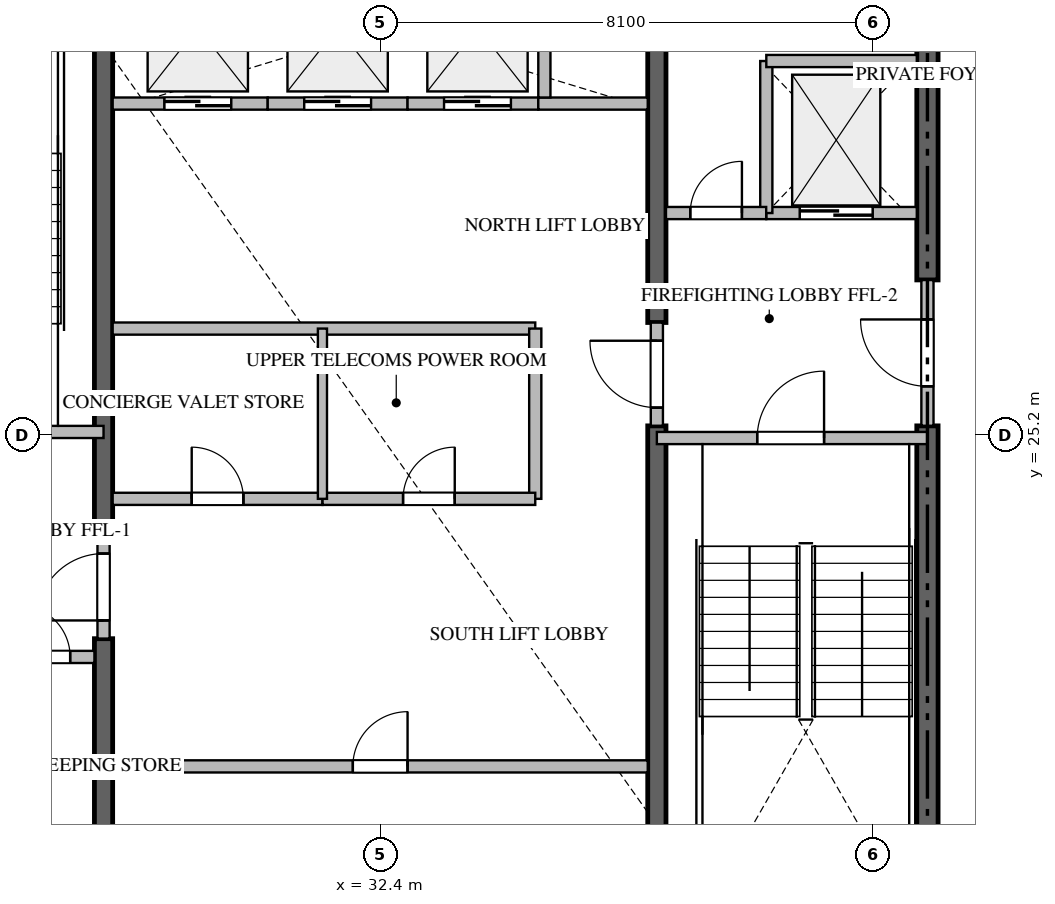
"""IFC4 building model, lengths in metres.
Left out: names, types, materials, properties, quantities, classifications, styles, units other than length and angle.
Written with IfcOpenShell. Run it as: python <this file> out.ifc"""

import sys

from ifc_helpers import new_model, si_unit, direction, frame, frame_2d, origin, place, context, subcontext, project, spatial, rectangle, extrude, source, transform, mapped, element, fill, save


model = new_model("IFC4")
c1 = context("Model", 3, precision=1e-05, world=origin(), true_north=direction((0.0, 1.0)))
c2 = subcontext(c1, "Body", "Model", "MODEL_VIEW")
j1 = project(units=[si_unit("LENGTHUNIT", "METRE"), si_unit("PLANEANGLEUNIT", "RADIAN")], contexts=[c1])
p1 = place(None, origin())
s1 = spatial("IfcSite", under=j1, at=p1, CompositionType="ELEMENT")
p2 = place(p1, origin())
s2 = spatial("IfcBuilding", under=s1, at=p2, CompositionType="ELEMENT")
p3 = place(p2, frame((0.0, 0.0, 245.1)))
s3 = spatial("IfcBuildingStorey", under=s2, at=p3, CompositionType="ELEMENT", Elevation=245.1)
p4 = place(p3, frame((41.4, 16.975, -0.26), z_axis=(0.0, 0.0, 1.0), x_axis=(0.0, 1.0, 0.0)))
e1 = element("IfcWall", 1, at=p4, inside=s3, PredefinedType="SHEAR", context=c2, shape_type="SweptSolid", body=[
    extrude(rectangle(XDim=8.375, YDim=0.35, at=frame_2d((4.188, 0.0))), origin(), (0.0, 0.0, 1.0), 3.848),
])
p5 = place(p3, frame((41.4, 27.75, -0.26), z_axis=(0.0, 0.0, 1.0), x_axis=(0.0, 1.0, 0.0)))
e2 = element("IfcWall", 2, at=p5, inside=s3, PredefinedType="SHEAR", context=c2, shape_type="SweptSolid", body=[
    extrude(rectangle(XDim=5.675, YDim=0.35, at=frame_2d((2.837, 0.0))), origin(), (0.0, 0.0, 1.0), 3.848),
])
p6 = place(p3, frame((27.85, 16.975, -0.26), z_axis=(0.0, 0.0, 1.0), x_axis=(0.0, 1.0, 0.0)))
e3 = element("IfcWall", 3, at=p6, inside=s3, PredefinedType="SHEAR", context=c2, shape_type="SweptSolid", body=[
    extrude(rectangle(XDim=4.875, YDim=0.3, at=frame_2d((2.438, 0.0))), origin(), (0.0, 0.0, 1.0), 3.848),
])
p7 = place(p3, frame((27.85, 23.55, -0.26), z_axis=(0.0, 0.0, 1.0), x_axis=(0.0, 1.0, 0.0)))
e4 = element("IfcWall", 4, at=p7, inside=s3, PredefinedType="SHEAR", context=c2, shape_type="SweptSolid", body=[
    extrude(rectangle(XDim=9.875, YDim=0.3, at=frame_2d((4.938, 0.0))), origin(), (0.0, 0.0, 1.0), 3.848),
])
p8 = place(p3, frame((36.95, 16.975, -0.26), z_axis=(0.0, 0.0, 1.0), x_axis=(0.0, 1.0, 0.0)))
e5 = element("IfcWall", 5, at=p8, inside=s3, PredefinedType="SHEAR", context=c2, shape_type="SweptSolid", body=[
    extrude(rectangle(XDim=8.375, YDim=0.3, at=frame_2d((4.188, 0.0))), origin(), (0.0, 0.0, 1.0), 3.848),
])
p9 = place(p3, frame((36.95, 27.05, -0.26), z_axis=(0.0, 0.0, 1.0), x_axis=(0.0, 1.0, 0.0)))
e6 = element("IfcWall", 6, at=p9, inside=s3, PredefinedType="SHEAR", context=c2, shape_type="SweptSolid", body=[
    extrude(rectangle(XDim=6.375, YDim=0.3, at=frame_2d((3.188, 0.0))), origin(), (0.0, 0.0, 1.0), 3.848),
])
p10 = place(p3, frame((23.4, 25.25, 0.0), z_axis=(0.0, 0.0, 1.0), x_axis=(1.0, 0.0, 0.0)))
e7 = element("IfcWall", 7, at=p10, inside=s3, PredefinedType="STANDARD", context=c2, shape_type="SweptSolid", body=[
    extrude(rectangle(XDim=4.45, YDim=0.2, at=frame_2d((2.225, 0.0))), origin(), (0.0, 0.0, 1.0), 3.59),
])
p11 = place(p10, frame((1.65, 0.0, 0.0)))
e8 = element("IfcOpeningElement", 8, at=p11, cuts=e7, PredefinedType="OPENING", context=c2, shape_type="SweptSolid", body=[
    extrude(rectangle(XDim=1.1, YDim=2.15, at=frame_2d((0.55, 1.075))), frame((0.0, 0.11, 0.0), z_axis=(0.0, -1.0, 0.0), x_axis=(1.0, 0.0, 0.0)), (0.0, 0.0, 1.0), 0.22),
])
p12 = place(p3, frame((36.95, 25.15, 0.0), z_axis=(0.0, 0.0, 1.0), x_axis=(1.0, 0.0, 0.0)))
e9 = element("IfcWall", 9, at=p12, inside=s3, PredefinedType="STANDARD", context=c2, shape_type="SweptSolid", body=[
    extrude(rectangle(XDim=4.45, YDim=0.2, at=frame_2d((2.225, 0.0))), origin(), (0.0, 0.0, 1.0), 3.59),
])
p13 = place(p12, frame((1.65, 0.0, 0.0)))
e10 = element("IfcOpeningElement", 10, at=p13, cuts=e9, PredefinedType="OPENING", context=c2, shape_type="SweptSolid", body=[
    extrude(rectangle(XDim=1.1, YDim=2.15, at=frame_2d((0.55, 1.075))), frame((0.0, 0.11, 0.0), z_axis=(0.0, -1.0, 0.0), x_axis=(1.0, 0.0, 0.0)), (0.0, 0.0, 1.0), 0.22),
])
p14 = place(p3, frame((38.75, 28.85, 0.0), z_axis=(0.0, 0.0, 1.0), x_axis=(1.0, 0.0, 0.0)))
e11 = element("IfcWall", 11, at=p14, inside=s3, PredefinedType="STANDARD", context=c2, shape_type="SweptSolid", body=[
    extrude(rectangle(XDim=2.475, YDim=0.2, at=frame_2d((1.238, 0.0))), origin(), (0.0, 0.0, 1.0), 3.59),
])
p15 = place(p14, frame((0.55, 0.0, 0.0)))
e12 = element("IfcOpeningElement", 12, at=p15, cuts=e11, PredefinedType="OPENING", context=c2, shape_type="SweptSolid", body=[
    extrude(rectangle(XDim=1.2, YDim=2.2, at=frame_2d((0.6, 1.1))), frame((0.0, 0.11, 0.0), z_axis=(0.0, -1.0, 0.0), x_axis=(1.0, 0.0, 0.0)), (0.0, 0.0, 1.0), 0.22),
])
p16 = place(p3, frame((28.0, 30.65, 0.0), z_axis=(0.0, 0.0, 1.0), x_axis=(1.0, 0.0, 0.0)))
e13 = element("IfcWall", 13, at=p16, inside=s3, PredefinedType="STANDARD", context=c2, shape_type="SweptSolid", body=[
    extrude(rectangle(XDim=2.55, YDim=0.2, at=frame_2d((1.275, 0.0))), origin(), (0.0, 0.0, 1.0), 3.59),
])
p17 = place(p16, frame((0.85, 0.0, 0.0)))
e14 = element("IfcOpeningElement", 14, at=p17, cuts=e13, PredefinedType="OPENING", context=c2, shape_type="SweptSolid", body=[
    extrude(rectangle(XDim=1.1, YDim=2.2, at=frame_2d((0.55, 1.1))), frame((0.0, 0.11, 0.0), z_axis=(0.0, -1.0, 0.0), x_axis=(1.0, 0.0, 0.0)), (0.0, 0.0, 1.0), 0.22),
])
p18 = place(p3, frame((30.55, 30.65, 0.0), z_axis=(0.0, 0.0, 1.0), x_axis=(1.0, 0.0, 0.0)))
e15 = element("IfcWall", 15, at=p18, inside=s3, PredefinedType="STANDARD", context=c2, shape_type="SweptSolid", body=[
    extrude(rectangle(XDim=2.3, YDim=0.2, at=frame_2d((1.15, 0.0))), origin(), (0.0, 0.0, 1.0), 3.59),
])
p19 = place(p18, frame((0.6, 0.0, 0.0)))
e16 = element("IfcOpeningElement", 16, at=p19, cuts=e15, PredefinedType="OPENING", context=c2, shape_type="SweptSolid", body=[
    extrude(rectangle(XDim=1.1, YDim=2.2, at=frame_2d((0.55, 1.1))), frame((0.0, 0.11, 0.0), z_axis=(0.0, -1.0, 0.0), x_axis=(1.0, 0.0, 0.0)), (0.0, 0.0, 1.0), 0.22),
])
p20 = place(p3, frame((32.85, 30.65, 0.0), z_axis=(0.0, 0.0, 1.0), x_axis=(1.0, 0.0, 0.0)))
e17 = element("IfcWall", 17, at=p20, inside=s3, PredefinedType="STANDARD", context=c2, shape_type="SweptSolid", body=[
    extrude(rectangle(XDim=2.15, YDim=0.2, at=frame_2d((1.075, 0.0))), origin(), (0.0, 0.0, 1.0), 3.59),
])
p21 = place(p20, frame((0.6, 0.0, 0.0)))
e18 = element("IfcOpeningElement", 18, at=p21, cuts=e17, PredefinedType="OPENING", context=c2, shape_type="SweptSolid", body=[
    extrude(rectangle(XDim=1.1, YDim=2.2, at=frame_2d((0.55, 1.1))), frame((0.0, 0.11, 0.0), z_axis=(0.0, -1.0, 0.0), x_axis=(1.0, 0.0, 0.0)), (0.0, 0.0, 1.0), 0.22),
])
p22 = place(p3, frame((35.0, 30.65, 0.0), z_axis=(0.0, 0.0, 1.0), x_axis=(1.0, 0.0, 0.0)))
e19 = element("IfcWall", 19, at=p22, inside=s3, PredefinedType="STANDARD", context=c2, shape_type="SweptSolid", body=[
    extrude(rectangle(XDim=1.8, YDim=0.2, at=frame_2d((0.9, 0.0))), origin(), (0.0, 0.0, 1.0), 3.59),
])
p23 = place(p3, frame((35.1, 30.75, 0.0), z_axis=(0.0, 0.0, 1.0), x_axis=(0.0, 1.0, 0.0)))
e20 = element("IfcWall", 20, at=p23, inside=s3, PredefinedType="STANDARD", context=c2, shape_type="SweptSolid", body=[
    extrude(rectangle(XDim=2.675, YDim=0.2, at=frame_2d((1.337, 0.0))), origin(), (0.0, 0.0, 1.0), 3.59),
])
p24 = place(p3, frame((26.052, 21.55, 0.0), z_axis=(0.0, 0.0, 1.0), x_axis=(1.0, 0.0, 0.0)))
e21 = element("IfcWall", 21, at=p24, inside=s3, PredefinedType="STANDARD", context=c2, shape_type="SweptSolid", body=[
    extrude(rectangle(XDim=1.648, YDim=0.2, at=frame_2d((0.824, 0.0))), origin(), (0.0, 0.0, 1.0), 3.59),
])
p25 = place(p24, frame((0.399, 0.0, 0.0)))
e22 = element("IfcOpeningElement", 22, at=p25, cuts=e21, PredefinedType="OPENING", context=c2, shape_type="SweptSolid", body=[
    extrude(rectangle(XDim=0.85, YDim=2.1, at=frame_2d((0.425, 1.05))), frame((0.0, 0.11, 0.0), z_axis=(0.0, -1.0, 0.0), x_axis=(1.0, 0.0, 0.0)), (0.0, 0.0, 1.0), 0.22),
])
p26 = place(p3, frame((38.75, 28.85, 0.0), z_axis=(0.0, 0.0, 1.0), x_axis=(0.0, 1.0, 0.0)))
e23 = element("IfcWall", 23, at=p26, inside=s3, PredefinedType="STANDARD", context=c2, shape_type="SweptSolid", body=[
    extrude(rectangle(XDim=2.5, YDim=0.2, at=frame_2d((1.25, 0.0))), origin(), (0.0, 0.0, 1.0), 3.59),
])
p27 = place(p3, frame((38.75, 31.35, 0.0), z_axis=(0.0, 0.0, 1.0), x_axis=(1.0, 0.0, 0.0)))
e24 = element("IfcWall", 24, at=p27, inside=s3, PredefinedType="STANDARD", context=c2, shape_type="SweptSolid", body=[
    extrude(rectangle(XDim=2.475, YDim=0.2, at=frame_2d((1.238, 0.0))), origin(), (0.0, 0.0, 1.0), 3.59),
])
p28 = place(p3, frame((37.1, 28.85, 0.0), z_axis=(0.0, 0.0, 1.0), x_axis=(1.0, 0.0, 0.0)))
e25 = element("IfcWall", 25, at=p28, inside=s3, PredefinedType="STANDARD", context=c2, shape_type="SweptSolid", body=[
    extrude(rectangle(XDim=1.648, YDim=0.2, at=frame_2d((0.824, 0.0))), origin(), (0.0, 0.0, 1.0), 3.59),
])
p29 = place(p28, frame((0.399, 0.0, 0.0)))
e26 = element("IfcOpeningElement", 26, at=p29, cuts=e25, PredefinedType="OPENING", context=c2, shape_type="SweptSolid", body=[
    extrude(rectangle(XDim=0.85, YDim=2.1, at=frame_2d((0.425, 1.05))), frame((0.0, 0.11, 0.0), z_axis=(0.0, -1.0, 0.0), x_axis=(1.0, 0.0, 0.0)), (0.0, 0.0, 1.0), 0.22),
])
p30 = place(p3, frame((41.4, 25.352, 0.0), z_axis=(0.0, 0.0, 1.0), x_axis=(0.0, 1.0, 0.0)))
e27 = element("IfcWall", 27, at=p30, inside=s3, PredefinedType="STANDARD", context=c2, shape_type="SweptSolid", body=[
    extrude(rectangle(XDim=2.396, YDim=0.2, at=frame_2d((1.198, 0.0))), origin(), (0.0, 0.0, 1.0), 3.59),
])
p31 = place(p30, frame((0.648, 0.0, 0.0)))
e28 = element("IfcOpeningElement", 28, at=p31, cuts=e27, PredefinedType="OPENING", context=c2, shape_type="SweptSolid", body=[
    extrude(rectangle(XDim=1.1, YDim=2.15, at=frame_2d((0.55, 1.075))), frame((0.0, 0.11, 0.0), z_axis=(0.0, -1.0, 0.0), x_axis=(1.0, 0.0, 0.0)), (0.0, 0.0, 1.0), 0.22),
])
p32 = place(p3, frame((27.85, 21.852, 0.0), z_axis=(0.0, 0.0, 1.0), x_axis=(0.0, 1.0, 0.0)))
e29 = element("IfcWall", 29, at=p32, inside=s3, PredefinedType="STANDARD", context=c2, shape_type="SweptSolid", body=[
    extrude(rectangle(XDim=1.696, YDim=0.2, at=frame_2d((0.848, 0.0))), origin(), (0.0, 0.0, 1.0), 3.59),
])
p33 = place(p32, frame((0.298, 0.0, 0.0)))
e30 = element("IfcOpeningElement", 30, at=p33, cuts=e29, PredefinedType="OPENING", context=c2, shape_type="SweptSolid", body=[
    extrude(rectangle(XDim=1.1, YDim=2.15, at=frame_2d((0.55, 1.075))), frame((0.0, 0.11, 0.0), z_axis=(0.0, -1.0, 0.0), x_axis=(1.0, 0.0, 0.0)), (0.0, 0.0, 1.0), 0.22),
])
p34 = place(p3, frame((36.95, 25.352, 0.0), z_axis=(0.0, 0.0, 1.0), x_axis=(0.0, 1.0, 0.0)))
e31 = element("IfcWall", 31, at=p34, inside=s3, PredefinedType="STANDARD", context=c2, shape_type="SweptSolid", body=[
    extrude(rectangle(XDim=1.696, YDim=0.2, at=frame_2d((0.848, 0.0))), origin(), (0.0, 0.0, 1.0), 3.59),
])
p35 = place(p34, frame((0.298, 0.0, 0.0)))
e32 = element("IfcOpeningElement", 32, at=p35, cuts=e31, PredefinedType="OPENING", context=c2, shape_type="SweptSolid", body=[
    extrude(rectangle(XDim=1.1, YDim=2.15, at=frame_2d((0.55, 1.075))), frame((0.0, 0.11, 0.0), z_axis=(0.0, -1.0, 0.0), x_axis=(1.0, 0.0, 0.0)), (0.0, 0.0, 1.0), 0.22),
])
p36 = place(p3, frame((28.0, 19.75, 0.0), z_axis=(0.0, 0.0, 1.0), x_axis=(1.0, 0.0, 0.0)))
e33 = element("IfcWall", 33, at=p36, inside=s3, PredefinedType="STANDARD", context=c2, shape_type="SweptSolid", body=[
    extrude(rectangle(XDim=8.8, YDim=0.2, at=frame_2d((4.4, 0.0))), origin(), (0.0, 0.0, 1.0), 3.59),
])
p37 = place(p36, frame((3.95, 0.0, 0.0)))
e34 = element("IfcOpeningElement", 34, at=p37, cuts=e33, PredefinedType="OPENING", context=c2, shape_type="SweptSolid", body=[
    extrude(rectangle(XDim=0.9, YDim=2.1, at=frame_2d((0.45, 1.05))), frame((0.0, 0.11, 0.0), z_axis=(0.0, -1.0, 0.0), x_axis=(1.0, 0.0, 0.0)), (0.0, 0.0, 1.0), 0.22),
])
p38 = place(p3, frame((28.0, 26.95, 0.0), z_axis=(0.0, 0.0, 1.0), x_axis=(1.0, 0.0, 0.0)))
e35 = element("IfcWall", 35, at=p38, inside=s3, PredefinedType="STANDARD", context=c2, shape_type="SweptSolid", body=[
    extrude(rectangle(XDim=6.95, YDim=0.2, at=frame_2d((3.475, 0.0))), origin(), (0.0, 0.0, 1.0), 3.59),
])
p39 = place(p3, frame((34.95, 24.15, 0.0), z_axis=(0.0, 0.0, 1.0), x_axis=(0.0, 1.0, 0.0)))
e36 = element("IfcWall", 36, at=p39, inside=s3, PredefinedType="STANDARD", context=c2, shape_type="SweptSolid", body=[
    extrude(rectangle(XDim=2.8, YDim=0.2, at=frame_2d((1.4, 0.0))), origin(), (0.0, 0.0, 1.0), 3.59),
])
p40 = place(p3, frame((28.0, 24.15, 0.0), z_axis=(0.0, 0.0, 1.0), x_axis=(1.0, 0.0, 0.0)))
e37 = element("IfcWall", 37, at=p40, inside=s3, PredefinedType="STANDARD", context=c2, shape_type="SweptSolid", body=[
    extrude(rectangle(XDim=3.45, YDim=0.2, at=frame_2d((1.725, 0.0))), origin(), (0.0, 0.0, 1.0), 3.59),
])
p41 = place(p40, frame((1.3, 0.0, 0.0)))
e38 = element("IfcOpeningElement", 38, at=p41, cuts=e37, PredefinedType="OPENING", context=c2, shape_type="SweptSolid", body=[
    extrude(rectangle(XDim=0.85, YDim=2.1, at=frame_2d((0.425, 1.05))), frame((0.0, 0.11, 0.0), z_axis=(0.0, -1.0, 0.0), x_axis=(1.0, 0.0, 0.0)), (0.0, 0.0, 1.0), 0.22),
])
p42 = place(p3, frame((31.452, 24.15, 0.0), z_axis=(0.0, 0.0, 1.0), x_axis=(1.0, 0.0, 0.0)))
e39 = element("IfcWall", 39, at=p42, inside=s3, PredefinedType="STANDARD", context=c2, shape_type="SweptSolid", body=[
    extrude(rectangle(XDim=3.498, YDim=0.2, at=frame_2d((1.749, 0.0))), origin(), (0.0, 0.0, 1.0), 3.59),
])
p43 = place(p42, frame((1.324, 0.0, 0.0)))
e40 = element("IfcOpeningElement", 40, at=p43, cuts=e39, PredefinedType="OPENING", context=c2, shape_type="SweptSolid", body=[
    extrude(rectangle(XDim=0.85, YDim=2.1, at=frame_2d((0.425, 1.05))), frame((0.0, 0.11, 0.0), z_axis=(0.0, -1.0, 0.0), x_axis=(1.0, 0.0, 0.0)), (0.0, 0.0, 1.0), 0.22),
])
p44 = place(p3, frame((31.45, 24.15, 0.0), z_axis=(0.0, 0.0, 1.0), x_axis=(0.0, 1.0, 0.0)))
e41 = element("IfcWall", 41, at=p44, inside=s3, PredefinedType="PARTITIONING", context=c2, shape_type="SweptSolid", body=[
    extrude(rectangle(XDim=2.8, YDim=0.15, at=frame_2d((1.4, 0.0))), origin(), (0.0, 0.0, 1.0), 3.59),
])
m1 = source(origin(), c2, "Body", "SweptSolid", [
    extrude(rectangle(XDim=1.1, YDim=2.15, at=frame_2d((0.55, 1.075))), frame((0.0, 0.025, 0.0), z_axis=(0.0, -1.0, 0.0), x_axis=(1.0, 0.0, 0.0)), (0.0, 0.0, 1.0), 0.05),
])
p45 = place(p13, origin())
e42 = element("IfcDoor", 42, at=p45, inside=s3, OperationType="SINGLE_SWING_RIGHT", PredefinedType="DOOR", context=c2, shape_type="MappedRepresentation", body=[
    mapped(m1, transform((0.0, 0.0, 0.0), scale=1.0)),
])
fill(e10, e42)
m2 = source(origin(), c2, "Body", "SweptSolid", [
    extrude(rectangle(XDim=1.2, YDim=2.2, at=frame_2d((0.6, 1.1))), frame((0.0, 0.025, 0.0), z_axis=(0.0, -1.0, 0.0), x_axis=(1.0, 0.0, 0.0)), (0.0, 0.0, 1.0), 0.05),
])
p46 = place(p15, origin())
e43 = element("IfcDoor", 43, at=p46, inside=s3, OperationType="DOUBLE_DOOR_SLIDING", PredefinedType="DOOR", context=c2, shape_type="MappedRepresentation", body=[
    mapped(m2, transform((0.0, 0.0, 0.0), scale=1.0)),
])
fill(e12, e43)
m3 = source(origin(), c2, "Body", "SweptSolid", [
    extrude(rectangle(XDim=1.1, YDim=2.2, at=frame_2d((0.55, 1.1))), frame((0.0, 0.025, 0.0), z_axis=(0.0, -1.0, 0.0), x_axis=(1.0, 0.0, 0.0)), (0.0, 0.0, 1.0), 0.05),
])
p47 = place(p17, origin())
e44 = element("IfcDoor", 44, at=p47, inside=s3, OperationType="DOUBLE_DOOR_SLIDING", PredefinedType="DOOR", context=c2, shape_type="MappedRepresentation", body=[
    mapped(m3, transform((0.0, 0.0, 0.0), scale=1.0)),
])
fill(e14, e44)
p48 = place(p19, origin())
e45 = element("IfcDoor", 45, at=p48, inside=s3, OperationType="DOUBLE_DOOR_SLIDING", PredefinedType="DOOR", context=c2, shape_type="MappedRepresentation", body=[
    mapped(m3, transform((0.0, 0.0, 0.0), scale=1.0)),
])
fill(e16, e45)
p49 = place(p21, origin())
e46 = element("IfcDoor", 46, at=p49, inside=s3, OperationType="DOUBLE_DOOR_SLIDING", PredefinedType="DOOR", context=c2, shape_type="MappedRepresentation", body=[
    mapped(m3, transform((0.0, 0.0, 0.0), scale=1.0)),
])
fill(e18, e46)
m4 = source(origin(), c2, "Body", "SweptSolid", [
    extrude(rectangle(XDim=0.85, YDim=2.1, at=frame_2d((0.425, 1.05))), frame((0.0, 0.025, 0.0), z_axis=(0.0, -1.0, 0.0), x_axis=(1.0, 0.0, 0.0)), (0.0, 0.0, 1.0), 0.05),
])
p50 = place(p25, origin())
e47 = element("IfcDoor", 47, at=p50, inside=s3, OperationType="SINGLE_SWING_LEFT", PredefinedType="DOOR", context=c2, shape_type="MappedRepresentation", body=[
    mapped(m4, transform((0.0, 0.0, 0.0), scale=1.0)),
])
fill(e22, e47)
p51 = place(p29, origin())
e48 = element("IfcDoor", 48, at=p51, inside=s3, OperationType="SINGLE_SWING_RIGHT", PredefinedType="DOOR", context=c2, shape_type="MappedRepresentation", body=[
    mapped(m4, transform((0.0, 0.0, 0.0), scale=1.0)),
])
fill(e26, e48)
p52 = place(p31, origin())
e49 = element("IfcDoor", 49, at=p52, inside=s3, OperationType="SINGLE_SWING_RIGHT", PredefinedType="DOOR", context=c2, shape_type="MappedRepresentation", body=[
    mapped(m1, transform((0.0, 0.0, 0.0), scale=1.0)),
])
fill(e28, e49)
p53 = place(p33, origin())
e50 = element("IfcDoor", 50, at=p53, inside=s3, OperationType="SINGLE_SWING_LEFT", PredefinedType="DOOR", context=c2, shape_type="MappedRepresentation", body=[
    mapped(m1, transform((0.0, 0.0, 0.0), scale=1.0)),
])
fill(e30, e50)
p54 = place(p35, origin())
e51 = element("IfcDoor", 51, at=p54, inside=s3, OperationType="SINGLE_SWING_RIGHT", PredefinedType="DOOR", context=c2, shape_type="MappedRepresentation", body=[
    mapped(m1, transform((0.0, 0.0, 0.0), scale=1.0)),
])
fill(e32, e51)
m5 = source(origin(), c2, "Body", "SweptSolid", [
    extrude(rectangle(XDim=0.9, YDim=2.1, at=frame_2d((0.45, 1.05))), frame((0.0, 0.025, 0.0), z_axis=(0.0, -1.0, 0.0), x_axis=(1.0, 0.0, 0.0)), (0.0, 0.0, 1.0), 0.05),
])
p55 = place(p37, origin())
e52 = element("IfcDoor", 52, at=p55, inside=s3, OperationType="SINGLE_SWING_RIGHT", PredefinedType="DOOR", context=c2, shape_type="MappedRepresentation", body=[
    mapped(m5, transform((0.0, 0.0, 0.0), scale=1.0)),
])
fill(e34, e52)
p56 = place(p41, origin())
e53 = element("IfcDoor", 53, at=p56, inside=s3, OperationType="SINGLE_SWING_LEFT", PredefinedType="DOOR", context=c2, shape_type="MappedRepresentation", body=[
    mapped(m4, transform((0.0, 0.0, 0.0), scale=1.0)),
])
fill(e38, e53)
p57 = place(p43, origin())
e54 = element("IfcDoor", 54, at=p57, inside=s3, OperationType="SINGLE_SWING_RIGHT", PredefinedType="DOOR", context=c2, shape_type="MappedRepresentation", body=[
    mapped(m4, transform((0.0, 0.0, 0.0), scale=1.0)),
])
fill(e40, e54)
save(model, sys.argv[1])
